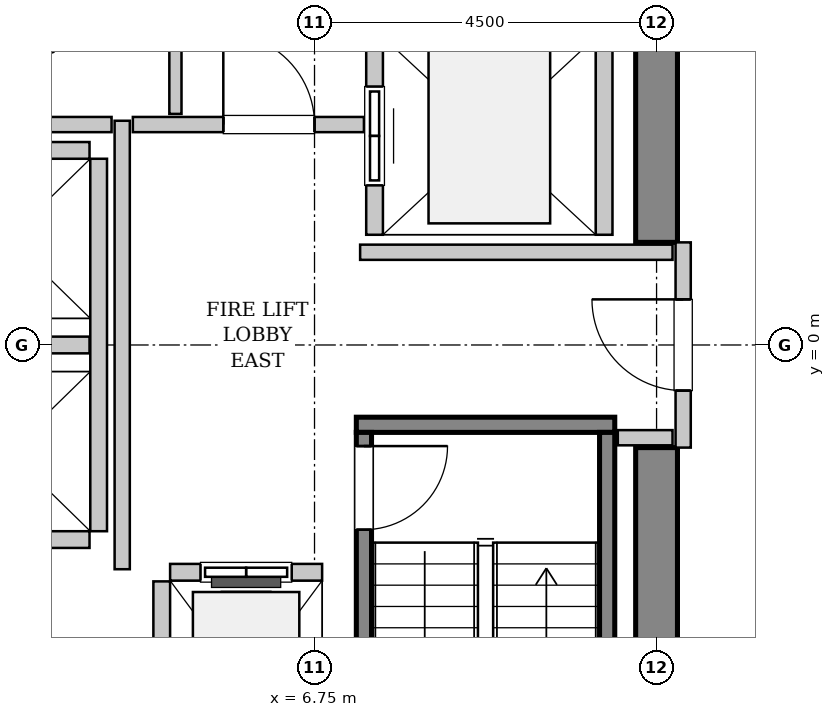
"""IFC4 building model, lengths in metres.
Left out: names, types, materials, properties, quantities, classifications, styles, units other than length and angle.
Written with IfcOpenShell. Run it as: python <this file> out.ifc"""

import sys

from ifc_helpers import new_model, si_unit, direction, frame, frame_2d, origin, place, context, subcontext, project, spatial, rectangle, extrude, source, transform, mapped, element, fill, save


model = new_model("IFC4")
c1 = context("Model", 3, precision=1e-05, world=origin(), true_north=direction((0.0, 1.0)))
c2 = subcontext(c1, "Body", "Model", "MODEL_VIEW")
j1 = project(units=[si_unit("LENGTHUNIT", "METRE"), si_unit("PLANEANGLEUNIT", "RADIAN")], contexts=[c1])
p1 = place(None, origin())
s1 = spatial("IfcSite", under=j1, at=p1, CompositionType="ELEMENT")
p2 = place(p1, origin())
s2 = spatial("IfcBuilding", under=s1, at=p2, CompositionType="ELEMENT")
p3 = place(p2, frame((0.0, 0.0, 186.8)))
s3 = spatial("IfcBuildingStorey", under=s2, at=p3, CompositionType="ELEMENT", Elevation=186.8)
m1 = source(origin(), c2, "Body", "SweptSolid", [
    extrude(rectangle(XDim=7.375, YDim=0.55, at=frame_2d((3.688, 0.0))), origin(), (0.0, 0.0, 1.0), 3.8),
])
for number, where, z_axis, x_axis in (
    (1, (11.25, -8.725, 0.0), (0.0, 0.0, 1.0), (0.0, 1.0, 0.0)),
    (2, (11.25, 1.35, 0.0), (0.0, 0.0, 1.0), (0.0, 1.0, 0.0)),
):
    element("IfcWall", number, at=place(p3, frame(where, z_axis=z_axis, x_axis=x_axis)), inside=s3, PredefinedType="SHEAR", context=c2, shape_type="MappedRepresentation", body=[
        mapped(m1, transform((0.0, 0.0, 0.0), x_axis=(1.0, 0.0, 0.0), y_axis=(0.0, 1.0, 0.0), z_axis=(0.0, 0.0, 1.0), scale=1.0)),
    ])
m2 = source(origin(), c2, "Body", "SweptSolid", [
    extrude(rectangle(XDim=3.4, YDim=0.2, at=frame_2d((1.7, 0.0))), origin(), (0.0, 0.0, 1.0), 3.8),
])
p4 = place(p3, frame((7.3, -1.05, 0.0), z_axis=(0.0, 0.0, 1.0), x_axis=(1.0, 0.0, 0.0)))
e3 = element("IfcWall", 3, at=p4, inside=s3, PredefinedType="SOLIDWALL", context=c2, shape_type="MappedRepresentation", body=[
    mapped(m2, transform((0.0, 0.0, 0.0), x_axis=(1.0, 0.0, 0.0), y_axis=(0.0, 1.0, 0.0), z_axis=(0.0, 0.0, 1.0), scale=1.0)),
])
m3 = source(origin(), c2, "Body", "SweptSolid", [
    extrude(rectangle(XDim=7.1, YDim=0.2, at=frame_2d((3.55, 0.0))), origin(), (0.0, 0.0, 1.0), 3.8),
])
p5 = place(p3, frame((7.4, -1.15, 0.0), z_axis=(0.0, 0.0, 1.0), x_axis=(0.0, -1.0, 0.0)))
e4 = element("IfcWall", 4, at=p5, inside=s3, PredefinedType="SOLIDWALL", context=c2, shape_type="MappedRepresentation", body=[
    mapped(m3, transform((0.0, 0.0, 0.0), x_axis=(1.0, 0.0, 0.0), y_axis=(0.0, 1.0, 0.0), z_axis=(0.0, 0.0, 1.0), scale=1.0)),
])
p6 = place(p5, frame((0.18, 0.0, 0.0)))
e5 = element("IfcOpeningElement", 5, at=p6, cuts=e4, PredefinedType="OPENING", context=c2, shape_type="SweptSolid", body=[
    extrude(rectangle(XDim=1.1, YDim=2.15, at=frame_2d((0.55, 1.075))), frame((0.0, 0.11, 0.0), z_axis=(0.0, -1.0, 0.0), x_axis=(1.0, 0.0, 0.0)), (0.0, 0.0, 1.0), 0.22),
])
p7 = place(p3, frame((10.6, -1.15, 0.0), z_axis=(0.0, 0.0, 1.0), x_axis=(0.0, -1.0, 0.0)))
e6 = element("IfcWall", 6, at=p7, inside=s3, PredefinedType="SOLIDWALL", context=c2, shape_type="MappedRepresentation", body=[
    mapped(m3, transform((0.0, 0.0, 0.0), x_axis=(1.0, 0.0, 0.0), y_axis=(0.0, 1.0, 0.0), z_axis=(0.0, 0.0, 1.0), scale=1.0)),
])
m4 = source(origin(), c2, "Body", "SweptSolid", [
    extrude(rectangle(XDim=2.0, YDim=0.22, at=frame_2d((1.0, 0.0))), origin(), (0.0, 0.0, 1.0), 3.535),
])
p8 = place(p3, frame((6.85, -2.99, 0.0), z_axis=(0.0, 0.0, 1.0), x_axis=(-1.0, 0.0, 0.0)))
e7 = element("IfcWall", 7, at=p8, inside=s3, PredefinedType="SOLIDWALL", context=c2, shape_type="MappedRepresentation", body=[
    mapped(m4, transform((0.0, 0.0, 0.0), x_axis=(1.0, 0.0, 0.0), y_axis=(0.0, 1.0, 0.0), z_axis=(0.0, 0.0, 1.0), scale=1.0)),
])
p9 = place(p8, frame((0.4, 0.0, 0.0)))
e8 = element("IfcOpeningElement", 8, at=p9, cuts=e7, PredefinedType="OPENING", context=c2, shape_type="SweptSolid", body=[
    extrude(rectangle(XDim=1.2, YDim=2.2, at=frame_2d((0.6, 1.1))), frame((0.0, 0.12, 0.0), z_axis=(0.0, -1.0, 0.0), x_axis=(1.0, 0.0, 0.0)), (0.0, 0.0, 1.0), 0.24),
])
m5 = source(origin(), c2, "Body", "SweptSolid", [
    extrude(rectangle(XDim=2.68, YDim=0.22, at=frame_2d((1.34, 0.0))), origin(), (0.0, 0.0, 1.0), 3.535),
])
p10 = place(p3, frame((4.74, -3.11, 0.0), z_axis=(0.0, 0.0, 1.0), x_axis=(0.0, -1.0, 0.0)))
e9 = element("IfcWall", 9, at=p10, inside=s3, PredefinedType="SOLIDWALL", context=c2, shape_type="MappedRepresentation", body=[
    mapped(m5, transform((0.0, 0.0, 0.0), x_axis=(1.0, 0.0, 0.0), y_axis=(0.0, 1.0, 0.0), z_axis=(0.0, 0.0, 1.0), scale=1.0)),
])
m6 = source(origin(), c2, "Body", "SweptSolid", [
    extrude(rectangle(XDim=5.45, YDim=0.22, at=frame_2d((2.725, 0.0))), origin(), (0.0, 0.0, 1.0), 3.535),
])
p11 = place(p3, frame((7.54, 6.9, 0.0), z_axis=(0.0, 0.0, 1.0), x_axis=(0.0, -1.0, 0.0)))
e10 = element("IfcWall", 10, at=p11, inside=s3, PredefinedType="SOLIDWALL", context=c2, shape_type="MappedRepresentation", body=[
    mapped(m6, transform((0.0, 0.0, 0.0), x_axis=(1.0, 0.0, 0.0), y_axis=(0.0, 1.0, 0.0), z_axis=(0.0, 0.0, 1.0), scale=1.0)),
])
p12 = place(p11, frame((3.5, 0.0, 0.0)))
e11 = element("IfcOpeningElement", 11, at=p12, cuts=e10, PredefinedType="OPENING", context=c2, shape_type="SweptSolid", body=[
    extrude(rectangle(XDim=1.3, YDim=2.3, at=frame_2d((0.65, 1.15))), frame((0.0, 0.12, 0.0), z_axis=(0.0, -1.0, 0.0), x_axis=(1.0, 0.0, 0.0)), (0.0, 0.0, 1.0), 0.24),
])
p13 = place(p11, frame((0.65, 0.0, 0.0)))
e12 = element("IfcOpeningElement", 12, at=p13, cuts=e10, PredefinedType="OPENING", context=c2, shape_type="SweptSolid", body=[
    extrude(rectangle(XDim=1.3, YDim=2.3, at=frame_2d((0.65, 1.15))), frame((0.0, 0.12, 0.0), z_axis=(0.0, -1.0, 0.0), x_axis=(1.0, 0.0, 0.0)), (0.0, 0.0, 1.0), 0.24),
])
p14 = place(p3, frame((10.56, 1.45, 0.0), z_axis=(0.0, 0.0, 1.0), x_axis=(0.0, 1.0, 0.0)))
e13 = element("IfcWall", 13, at=p14, inside=s3, PredefinedType="SOLIDWALL", context=c2, shape_type="MappedRepresentation", body=[
    mapped(m6, transform((0.0, 0.0, 0.0), x_axis=(1.0, 0.0, 0.0), y_axis=(0.0, 1.0, 0.0), z_axis=(0.0, 0.0, 1.0), scale=1.0)),
])
m7 = source(origin(), c2, "Body", "SweptSolid", [
    extrude(rectangle(XDim=4.9, YDim=0.22, at=frame_2d((2.45, 0.0))), origin(), (0.0, 0.0, 1.0), 3.535),
])
p15 = place(p3, frame((3.91, -2.45, 0.0), z_axis=(0.0, 0.0, 1.0), x_axis=(0.0, 1.0, 0.0)))
e14 = element("IfcWall", 14, at=p15, inside=s3, PredefinedType="SOLIDWALL", context=c2, shape_type="MappedRepresentation", body=[
    mapped(m7, transform((0.0, 0.0, 0.0), x_axis=(1.0, 0.0, 0.0), y_axis=(0.0, 1.0, 0.0), z_axis=(0.0, 0.0, 1.0), scale=1.0)),
])
m8 = source(origin(), c2, "Body", "SweptSolid", [
    extrude(rectangle(XDim=2.13, YDim=0.22, at=frame_2d((1.065, 0.0))), origin(), (0.0, 0.0, 1.0), 3.535),
])
for number, where, z_axis, x_axis in (
    (15, (1.66, -2.56, 0.0), (0.0, 0.0, 1.0), (1.0, 0.0, 0.0)),
    (16, (1.66, 0.0, 0.0), (0.0, 0.0, 1.0), (1.0, 0.0, 0.0)),
    (17, (3.79, 2.56, 0.0), (0.0, 0.0, 1.0), (-1.0, 0.0, 0.0)),
):
    element("IfcWall", number, at=place(p3, frame(where, z_axis=z_axis, x_axis=x_axis)), inside=s3, PredefinedType="SOLIDWALL", context=c2, shape_type="MappedRepresentation", body=[
        mapped(m8, transform((0.0, 0.0, 0.0), x_axis=(1.0, 0.0, 0.0), y_axis=(0.0, 1.0, 0.0), z_axis=(0.0, 0.0, 1.0), scale=1.0)),
    ])
m9 = source(origin(), c2, "Body", "SweptSolid", [
    extrude(rectangle(XDim=2.7, YDim=0.2, at=frame_2d((1.35, 0.0))), origin(), (0.0, 0.0, 1.0), 2.425),
])
p16 = place(p3, frame((11.6, -1.35, 0.0), z_axis=(0.0, 0.0, 1.0), x_axis=(0.0, 1.0, 0.0)))
e18 = element("IfcWall", 18, at=p16, inside=s3, PredefinedType="PARTITIONING", context=c2, shape_type="MappedRepresentation", body=[
    mapped(m9, transform((0.0, 0.0, 0.0), x_axis=(1.0, 0.0, 0.0), y_axis=(0.0, 1.0, 0.0), z_axis=(0.0, 0.0, 1.0), scale=1.0)),
])
p17 = place(p16, frame((0.75, 0.0, 0.0)))
e19 = element("IfcOpeningElement", 19, at=p17, cuts=e18, PredefinedType="OPENING", context=c2, shape_type="SweptSolid", body=[
    extrude(rectangle(XDim=1.2, YDim=2.15, at=frame_2d((0.6, 1.075))), frame((0.0, 0.11, 0.0), z_axis=(0.0, -1.0, 0.0), x_axis=(1.0, 0.0, 0.0)), (0.0, 0.0, 1.0), 0.22),
])
m10 = source(origin(), c2, "Body", "SweptSolid", [
    extrude(rectangle(XDim=5.9, YDim=0.2, at=frame_2d((2.95, 0.0))), origin(), (0.0, 0.0, 1.0), 3.535),
])
p18 = place(p3, frame((4.22, -2.95, 0.0), z_axis=(0.0, 0.0, 1.0), x_axis=(0.0, 1.0, 0.0)))
e20 = element("IfcWall", 20, at=p18, inside=s3, PredefinedType="PARTITIONING", context=c2, shape_type="MappedRepresentation", body=[
    mapped(m10, transform((0.0, 0.0, 0.0), x_axis=(1.0, 0.0, 0.0), y_axis=(0.0, 1.0, 0.0), z_axis=(0.0, 0.0, 1.0), scale=1.0)),
])
m11 = source(origin(), c2, "Body", "SweptSolid", [
    extrude(rectangle(XDim=2.52, YDim=0.2, at=frame_2d((1.26, 0.0))), origin(), (0.0, 0.0, 1.0), 3.535),
])
p19 = place(p3, frame((1.56, 2.9, 0.0), z_axis=(0.0, 0.0, 1.0), x_axis=(1.0, 0.0, 0.0)))
e21 = element("IfcWall", 21, at=p19, inside=s3, PredefinedType="PARTITIONING", context=c2, shape_type="MappedRepresentation", body=[
    mapped(m11, transform((0.0, 0.0, 0.0), x_axis=(1.0, 0.0, 0.0), y_axis=(0.0, 1.0, 0.0), z_axis=(0.0, 0.0, 1.0), scale=1.0)),
])
m12 = source(origin(), c2, "Body", "SweptSolid", [
    extrude(rectangle(XDim=3.04, YDim=0.2, at=frame_2d((1.52, 0.0))), origin(), (0.0, 0.0, 1.0), 3.535),
])
p20 = place(p3, frame((4.36, 2.9, 0.0), z_axis=(0.0, 0.0, 1.0), x_axis=(1.0, 0.0, 0.0)))
e22 = element("IfcWall", 22, at=p20, inside=s3, PredefinedType="PARTITIONING", context=c2, shape_type="MappedRepresentation", body=[
    mapped(m12, transform((0.0, 0.0, 0.0), x_axis=(1.0, 0.0, 0.0), y_axis=(0.0, 1.0, 0.0), z_axis=(0.0, 0.0, 1.0), scale=1.0)),
])
p21 = place(p20, frame((1.19, 0.0, 0.0)))
e23 = element("IfcOpeningElement", 23, at=p21, cuts=e22, PredefinedType="OPENING", context=c2, shape_type="SweptSolid", body=[
    extrude(rectangle(XDim=1.2, YDim=2.15, at=frame_2d((0.6, 1.075))), frame((0.0, 0.11, 0.0), z_axis=(0.0, -1.0, 0.0), x_axis=(1.0, 0.0, 0.0)), (0.0, 0.0, 1.0), 0.22),
])
m13 = source(origin(), c2, "Body", "SweptSolid", [
    extrude(rectangle(XDim=4.11, YDim=0.2, at=frame_2d((2.055, 0.0))), origin(), (0.0, 0.0, 1.0), 3.535),
])
p22 = place(p3, frame((7.35, 1.22, 0.0), z_axis=(0.0, 0.0, 1.0), x_axis=(1.0, 0.0, 0.0)))
e24 = element("IfcWall", 24, at=p22, inside=s3, PredefinedType="PARTITIONING", context=c2, shape_type="MappedRepresentation", body=[
    mapped(m13, transform((0.0, 0.0, 0.0), x_axis=(1.0, 0.0, 0.0), y_axis=(0.0, 1.0, 0.0), z_axis=(0.0, 0.0, 1.0), scale=1.0)),
])
m14 = source(origin(), c2, "Body", "SweptSolid", [
    extrude(rectangle(XDim=0.72, YDim=0.2, at=frame_2d((0.36, 0.0))), origin(), (0.0, 0.0, 1.0), 3.535),
])
p23 = place(p3, frame((10.74, -1.22, 0.0), z_axis=(0.0, 0.0, 1.0), x_axis=(1.0, 0.0, 0.0)))
e25 = element("IfcWall", 25, at=p23, inside=s3, PredefinedType="PARTITIONING", context=c2, shape_type="MappedRepresentation", body=[
    mapped(m14, transform((0.0, 0.0, 0.0), x_axis=(1.0, 0.0, 0.0), y_axis=(0.0, 1.0, 0.0), z_axis=(0.0, 0.0, 1.0), scale=1.0)),
])
m15 = source(origin(), c2, "Body", "SweptSolid", [
    extrude(rectangle(XDim=5.45, YDim=0.16, at=frame_2d((2.725, 0.0))), origin(), (0.0, 0.0, 1.0), 3.535),
])
p24 = place(p3, frame((4.92, 3.04, 0.0), z_axis=(0.0, 0.0, 1.0), x_axis=(0.0, 1.0, 0.0)))
e26 = element("IfcWall", 26, at=p24, inside=s3, PredefinedType="PARTITIONING", context=c2, shape_type="MappedRepresentation", body=[
    mapped(m15, transform((0.0, 0.0, 0.0), x_axis=(1.0, 0.0, 0.0), y_axis=(0.0, 1.0, 0.0), z_axis=(0.0, 0.0, 1.0), scale=1.0)),
])
m16 = source(origin(), c2, "Body", "SweptSolid", [
    extrude(rectangle(XDim=1.1, YDim=2.15, at=frame_2d((0.55, 1.075))), frame((0.0, 0.025, 0.0), z_axis=(0.0, -1.0, 0.0), x_axis=(1.0, 0.0, 0.0)), (0.0, 0.0, 1.0), 0.05),
])
p25 = place(p6, origin())
e27 = element("IfcDoor", 27, at=p25, inside=s3, OperationType="SINGLE_SWING_LEFT", PredefinedType="DOOR", context=c2, shape_type="MappedRepresentation", body=[
    mapped(m16, transform((0.0, 0.0, 0.0), x_axis=(1.0, 0.0, 0.0), y_axis=(0.0, 1.0, 0.0), z_axis=(0.0, 0.0, 1.0), scale=1.0)),
])
fill(e5, e27)
m17 = source(origin(), c2, "Body", "SweptSolid", [
    extrude(rectangle(XDim=1.2, YDim=2.2, at=frame_2d((0.6, 1.1))), frame((0.0, 0.025, 0.0), z_axis=(0.0, -1.0, 0.0), x_axis=(1.0, 0.0, 0.0)), (0.0, 0.0, 1.0), 0.05),
])
p26 = place(p9, origin())
e28 = element("IfcDoor", 28, at=p26, inside=s3, OperationType="SLIDING_TO_LEFT", PredefinedType="DOOR", context=c2, shape_type="MappedRepresentation", body=[
    mapped(m17, transform((0.0, 0.0, 0.0), x_axis=(1.0, 0.0, 0.0), y_axis=(0.0, 1.0, 0.0), z_axis=(0.0, 0.0, 1.0), scale=1.0)),
])
fill(e8, e28)
m18 = source(origin(), c2, "Body", "SweptSolid", [
    extrude(rectangle(XDim=1.3, YDim=2.3, at=frame_2d((0.65, 1.15))), frame((0.0, 0.025, 0.0), z_axis=(0.0, -1.0, 0.0), x_axis=(1.0, 0.0, 0.0)), (0.0, 0.0, 1.0), 0.05),
])
p27 = place(p12, origin())
e29 = element("IfcDoor", 29, at=p27, inside=s3, OperationType="SLIDING_TO_RIGHT", PredefinedType="DOOR", context=c2, shape_type="MappedRepresentation", body=[
    mapped(m18, transform((0.0, 0.0, 0.0), x_axis=(1.0, 0.0, 0.0), y_axis=(0.0, 1.0, 0.0), z_axis=(0.0, 0.0, 1.0), scale=1.0)),
])
fill(e11, e29)
m19 = source(origin(), c2, "Body", "SweptSolid", [
    extrude(rectangle(XDim=1.2, YDim=2.15, at=frame_2d((0.6, 1.075))), frame((0.0, 0.025, 0.0), z_axis=(0.0, -1.0, 0.0), x_axis=(1.0, 0.0, 0.0)), (0.0, 0.0, 1.0), 0.05),
])
p28 = place(p17, origin())
e30 = element("IfcDoor", 30, at=p28, inside=s3, OperationType="SINGLE_SWING_RIGHT", PredefinedType="DOOR", context=c2, shape_type="MappedRepresentation", body=[
    mapped(m19, transform((0.0, 0.0, 0.0), x_axis=(1.0, 0.0, 0.0), y_axis=(0.0, 1.0, 0.0), z_axis=(0.0, 0.0, 1.0), scale=1.0)),
])
fill(e19, e30)
p29 = place(p21, origin())
e31 = element("IfcDoor", 31, at=p29, inside=s3, OperationType="SINGLE_SWING_LEFT", PredefinedType="DOOR", context=c2, shape_type="MappedRepresentation", body=[
    mapped(m19, transform((0.0, 0.0, 0.0), x_axis=(1.0, 0.0, 0.0), y_axis=(0.0, 1.0, 0.0), z_axis=(0.0, 0.0, 1.0), scale=1.0)),
])
fill(e23, e31)
save(model, sys.argv[1])
